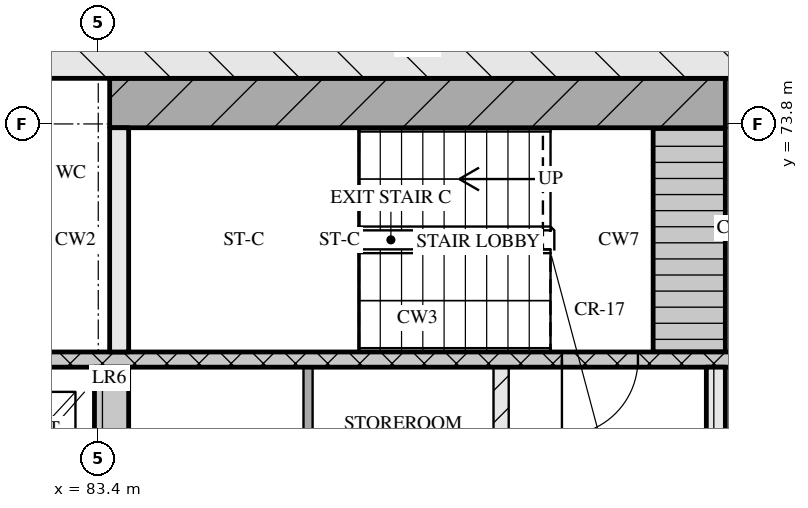
"""IFC4 building model, lengths in metres.
Left out: names, types, materials, properties, quantities, classifications, styles, units other than length and angle.
Written with IfcOpenShell. Run it as: python <this file> out.ifc"""

import sys

from ifc_helpers import new_model, si_unit, direction, frame, frame_2d, origin, place, context, subcontext, project, spatial, rectangle, extrude, element, fill, save


model = new_model("IFC4")
c1 = context("Model", 3, precision=1e-05, world=origin(), true_north=direction((0.0, 1.0)))
c2 = subcontext(c1, "Body", "Model", "MODEL_VIEW")
j1 = project(units=[si_unit("LENGTHUNIT", "METRE"), si_unit("PLANEANGLEUNIT", "RADIAN")], contexts=[c1])
p1 = place(None, origin())
s1 = spatial("IfcSite", under=j1, at=p1, CompositionType="ELEMENT")
p2 = place(p1, origin())
s2 = spatial("IfcBuilding", under=s1, at=p2, CompositionType="ELEMENT")
p3 = place(p2, frame((0.0, 0.0, 102.45)))
s3 = spatial("IfcBuildingStorey", under=s2, at=p3, CompositionType="ELEMENT", Elevation=102.45)
p4 = place(p3, frame((66.8, 74.9, 0.0), z_axis=(0.0, 0.0, 1.0), x_axis=(1.0, 0.0, 0.0)))
e1 = element("IfcWall", 1, at=p4, inside=s3, PredefinedType="SOLIDWALL", context=c2, shape_type="SweptSolid", body=[
    extrude(rectangle(XDim=41.6, YDim=1.0, at=frame_2d((20.8, 0.0))), origin(), (0.0, 0.0, 1.0), 3.32),
])
p5 = place(p3, frame((83.575, 68.0, 0.0), z_axis=(0.0, 0.0, 1.0), x_axis=(0.0, 1.0, 0.0)))
e2 = element("IfcWall", 2, at=p5, inside=s3, PredefinedType="SOLIDWALL", context=c2, shape_type="SweptSolid", body=[
    extrude(rectangle(XDim=2.6, YDim=0.45, at=frame_2d((1.3, 0.0))), origin(), (0.0, 0.0, 1.0), 3.32),
])
p6 = place(p3, frame((86.16, 68.0, 0.0), z_axis=(0.0, 0.0, 1.0), x_axis=(0.0, 1.0, 0.0)))
e3 = element("IfcWall", 3, at=p6, inside=s3, PredefinedType="PARTITIONING", context=c2, shape_type="SweptSolid", body=[
    extrude(rectangle(XDim=2.6, YDim=0.12, at=frame_2d((1.3, 0.0))), origin(), (0.0, 0.0, 1.0), 3.32),
])
p7 = place(p3, frame((88.7, 68.0, 0.0), z_axis=(0.0, 0.0, 1.0), x_axis=(0.0, 1.0, 0.0)))
e4 = element("IfcWall", 4, at=p7, inside=s3, PredefinedType="PARTITIONING", context=c2, shape_type="SweptSolid", body=[
    extrude(rectangle(XDim=2.6, YDim=0.2, at=frame_2d((1.3, 0.0))), origin(), (0.0, 0.0, 1.0), 3.32),
])
p8 = place(p3, frame((91.525, 68.0, 0.0), z_axis=(0.0, 0.0, 1.0), x_axis=(0.0, 1.0, 0.0)))
e5 = element("IfcWall", 5, at=p8, inside=s3, PredefinedType="SOLIDWALL", context=c2, shape_type="SweptSolid", body=[
    extrude(rectangle(XDim=2.6, YDim=0.25, at=frame_2d((1.3, 0.0))), origin(), (0.0, 0.0, 1.0), 3.32),
])
p9 = place(p3, frame((67.8, 70.7, 0.0), z_axis=(0.0, 0.0, 1.0), x_axis=(1.0, 0.0, 0.0)))
e6 = element("IfcWall", 6, at=p9, inside=s3, PredefinedType="SOLIDWALL", context=c2, shape_type="SweptSolid", body=[
    extrude(rectangle(XDim=39.6, YDim=0.2, at=frame_2d((19.8, 0.0))), origin(), (0.0, 0.0, 1.0), 3.32),
])
p10 = place(p9, frame((0.65, 0.0, 0.0)))
e7 = element("IfcOpeningElement", 7, at=p10, cuts=e6, PredefinedType="OPENING", context=c2, shape_type="SweptSolid", body=[
    extrude(rectangle(XDim=1.1, YDim=2.1, at=frame_2d((0.55, 1.05))), frame((0.0, 0.11, 0.0), z_axis=(0.0, -1.0, 0.0), x_axis=(1.0, 0.0, 0.0)), (0.0, 0.0, 1.0), 0.22),
])
p11 = place(p9, frame((3.25, 0.0, 0.0)))
e8 = element("IfcOpeningElement", 8, at=p11, cuts=e6, PredefinedType="OPENING", context=c2, shape_type="SweptSolid", body=[
    extrude(rectangle(XDim=1.1, YDim=2.1, at=frame_2d((0.55, 1.05))), frame((0.0, 0.11, 0.0), z_axis=(0.0, -1.0, 0.0), x_axis=(1.0, 0.0, 0.0)), (0.0, 0.0, 1.0), 0.22),
])
p12 = place(p9, frame((5.9, 0.0, 0.0)))
e9 = element("IfcOpeningElement", 9, at=p12, cuts=e6, PredefinedType="OPENING", context=c2, shape_type="SweptSolid", body=[
    extrude(rectangle(XDim=1.0, YDim=2.1, at=frame_2d((0.5, 1.05))), frame((0.0, 0.11, 0.0), z_axis=(0.0, -1.0, 0.0), x_axis=(1.0, 0.0, 0.0)), (0.0, 0.0, 1.0), 0.22),
])
p13 = place(p9, frame((21.7, 0.0, 0.0)))
e10 = element("IfcOpeningElement", 10, at=p13, cuts=e6, PredefinedType="OPENING", context=c2, shape_type="SweptSolid", body=[
    extrude(rectangle(XDim=1.0, YDim=2.1, at=frame_2d((0.5, 1.05))), frame((0.0, 0.11, 0.0), z_axis=(0.0, -1.0, 0.0), x_axis=(1.0, 0.0, 0.0)), (0.0, 0.0, 1.0), 0.22),
])
p14 = place(p9, frame((32.7, 0.0, 0.0)))
e11 = element("IfcOpeningElement", 11, at=p14, cuts=e6, PredefinedType="OPENING", context=c2, shape_type="SweptSolid", body=[
    extrude(rectangle(XDim=1.0, YDim=2.1, at=frame_2d((0.5, 1.05))), frame((0.0, 0.11, 0.0), z_axis=(0.0, -1.0, 0.0), x_axis=(1.0, 0.0, 0.0)), (0.0, 0.0, 1.0), 0.22),
])
p15 = place(p9, frame((35.25, 0.0, 0.0)))
e12 = element("IfcOpeningElement", 12, at=p15, cuts=e6, PredefinedType="OPENING", context=c2, shape_type="SweptSolid", body=[
    extrude(rectangle(XDim=1.1, YDim=2.1, at=frame_2d((0.55, 1.05))), frame((0.0, 0.11, 0.0), z_axis=(0.0, -1.0, 0.0), x_axis=(1.0, 0.0, 0.0)), (0.0, 0.0, 1.0), 0.22),
])
p16 = place(p9, frame((37.85, 0.0, 0.0)))
e13 = element("IfcOpeningElement", 13, at=p16, cuts=e6, PredefinedType="OPENING", context=c2, shape_type="SweptSolid", body=[
    extrude(rectangle(XDim=1.1, YDim=2.1, at=frame_2d((0.55, 1.05))), frame((0.0, 0.11, 0.0), z_axis=(0.0, -1.0, 0.0), x_axis=(1.0, 0.0, 0.0)), (0.0, 0.0, 1.0), 0.22),
])
p17 = place(p3, frame((83.675, 70.8, 0.0), z_axis=(0.0, 0.0, 1.0), x_axis=(0.0, 1.0, 0.0)))
e14 = element("IfcWall", 14, at=p17, inside=s3, PredefinedType="SOLIDWALL", context=c2, shape_type="SweptSolid", body=[
    extrude(rectangle(XDim=2.95, YDim=0.25, at=frame_2d((1.475, 0.0))), origin(), (0.0, 0.0, 1.0), 3.32),
])
p18 = place(p3, frame((91.175, 70.8, 0.0), z_axis=(0.0, 0.0, 1.0), x_axis=(0.0, 1.0, 0.0)))
e15 = element("IfcWall", 15, at=p18, inside=s3, PredefinedType="SOLIDWALL", context=c2, shape_type="SweptSolid", body=[
    extrude(rectangle(XDim=2.95, YDim=0.95, at=frame_2d((1.475, 0.0))), origin(), (0.0, 0.0, 1.0), 3.32),
])
p19 = place(p3, frame((83.55, 74.075, 0.0), z_axis=(0.0, 0.0, 1.0), x_axis=(1.0, 0.0, 0.0)))
e16 = element("IfcWall", 16, at=p19, inside=s3, PredefinedType="SOLIDWALL", context=c2, shape_type="SweptSolid", body=[
    extrude(rectangle(XDim=8.1, YDim=0.65, at=frame_2d((4.05, 0.0))), origin(), (0.0, 0.0, 1.0), 3.32),
])
p20 = place(p13, origin())
e17 = element("IfcDoor", 17, at=p20, inside=s3, OperationType="SINGLE_SWING_RIGHT", PredefinedType="DOOR", context=c2, shape_type="SweptSolid", body=[
    extrude(rectangle(XDim=1.0, YDim=2.1, at=frame_2d((0.5, 1.05))), frame((0.0, 0.025, 0.0), z_axis=(0.0, -1.0, 0.0), x_axis=(1.0, 0.0, 0.0)), (0.0, 0.0, 1.0), 0.05),
])
fill(e10, e17)
save(model, sys.argv[1])
